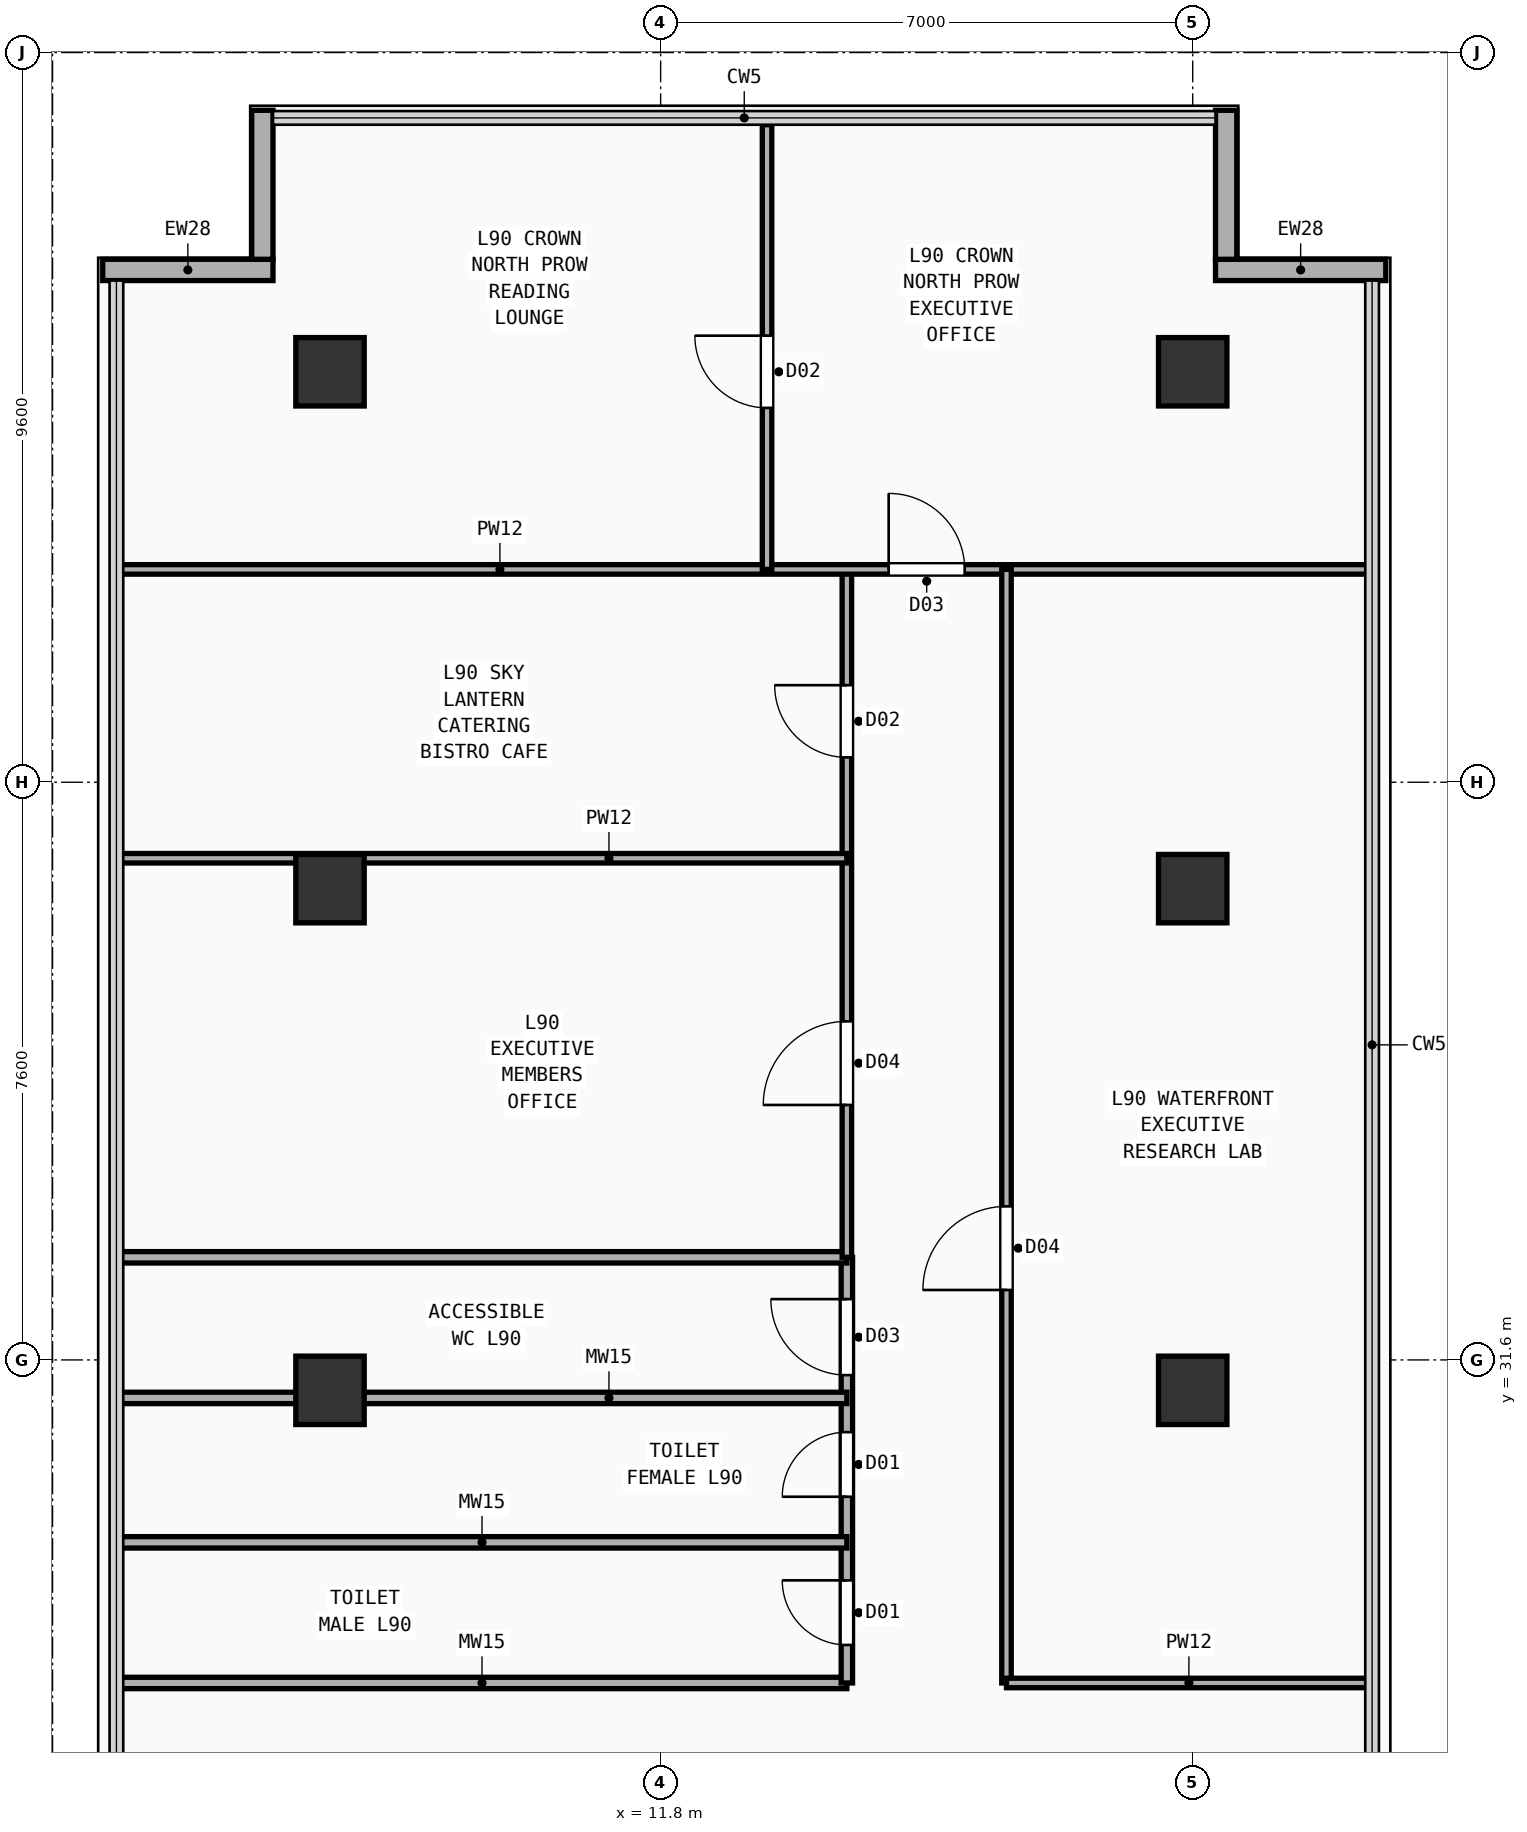
"""IFC4 building model, lengths in metres.
Left out: names, types, materials, properties, quantities, classifications, styles, units other than length and angle.
Written with IfcOpenShell. Run it as: python <this file> out.ifc"""

import sys

from ifc_helpers import new_model, si_unit, direction, frame, frame_2d, origin, origin_2d, place, context, subcontext, project, spatial, rectangle, extrude, element, fill, save


model = new_model("IFC4")
c1 = context("Model", 3, precision=1e-05, world=origin(), true_north=direction((0.0, 1.0)))
c2 = subcontext(c1, "Body", "Model", "MODEL_VIEW")
j1 = project(units=[si_unit("LENGTHUNIT", "METRE"), si_unit("PLANEANGLEUNIT", "RADIAN")], contexts=[c1])
p1 = place(None, origin())
s1 = spatial("IfcSite", under=j1, at=p1, CompositionType="ELEMENT")
p2 = place(p1, origin())
s2 = spatial("IfcBuilding", under=s1, at=p2, CompositionType="ELEMENT")
p3 = place(p2, frame((0.0, 0.0, 352.0)))
s3 = spatial("IfcBuildingStorey", under=s2, at=p3, CompositionType="ELEMENT", Elevation=352.0)
for number, where, z_axis, x_axis in (
    (1, (7.45, 31.2, 0.0), (0.0, 0.0, 1.0), (1.0, 0.0, 0.0)),
    (2, (7.45, 37.8, 0.0), (0.0, 0.0, 1.0), (1.0, 0.0, 0.0)),
    (3, (7.45, 44.6, 0.0), (0.0, 0.0, 1.0), (1.0, 0.0, 0.0)),
    (4, (18.8, 31.2, 0.0), (0.0, 0.0, 1.0), (1.0, 0.0, 0.0)),
    (5, (18.8, 37.8, 0.0), (0.0, 0.0, 1.0), (1.0, 0.0, 0.0)),
    (6, (18.8, 44.6, 0.0), (0.0, 0.0, 1.0), (1.0, 0.0, 0.0)),
):
    element("IfcColumn", number, at=place(p3, frame(where, z_axis=z_axis, x_axis=x_axis)), inside=s3, PredefinedType="COLUMN", context=c2, shape_type="SweptSolid", body=[
        extrude(rectangle(XDim=0.9, YDim=0.9, at=origin_2d()), origin(), (0.0, 0.0, 1.0), 3.82),
    ])
p4 = place(p3, frame((19.1, 45.94, 0.0), z_axis=(0.0, 0.0, 1.0), x_axis=(1.0, 0.0, 0.0)))
e7 = element("IfcWall", 7, at=p4, inside=s3, PredefinedType="SOLIDWALL", context=c2, shape_type="SweptSolid", body=[
    extrude(rectangle(XDim=2.24, YDim=0.28, at=frame_2d((1.12, 0.0))), origin(), (0.0, 0.0, 1.0), 3.82),
])
p5 = place(p3, frame((19.24, 46.08, 0.0), z_axis=(0.0, 0.0, 1.0), x_axis=(0.0, 1.0, 0.0)))
e8 = element("IfcWall", 8, at=p5, inside=s3, PredefinedType="SOLIDWALL", context=c2, shape_type="SweptSolid", body=[
    extrude(rectangle(XDim=1.96, YDim=0.28, at=frame_2d((0.98, 0.0))), origin(), (0.0, 0.0, 1.0), 3.82),
])
p6 = place(p3, frame((4.46, 45.94, 0.0), z_axis=(0.0, 0.0, 1.0), x_axis=(1.0, 0.0, 0.0)))
e9 = element("IfcWall", 9, at=p6, inside=s3, PredefinedType="SOLIDWALL", context=c2, shape_type="SweptSolid", body=[
    extrude(rectangle(XDim=2.24, YDim=0.28, at=frame_2d((1.12, 0.0))), origin(), (0.0, 0.0, 1.0), 3.82),
])
p7 = place(p3, frame((6.56, 46.08, 0.0), z_axis=(0.0, 0.0, 1.0), x_axis=(0.0, 1.0, 0.0)))
e10 = element("IfcWall", 10, at=p7, inside=s3, PredefinedType="SOLIDWALL", context=c2, shape_type="SweptSolid", body=[
    extrude(rectangle(XDim=1.96, YDim=0.28, at=frame_2d((0.98, 0.0))), origin(), (0.0, 0.0, 1.0), 3.82),
])
p8 = place(p3, frame((4.65, 27.35, 0.0), z_axis=(0.0, 0.0, 1.0), x_axis=(1.0, 0.0, 0.0)))
e11 = element("IfcWall", 11, at=p8, inside=s3, PredefinedType="PLUMBINGWALL", context=c2, shape_type="SweptSolid", body=[
    extrude(rectangle(XDim=9.6, YDim=0.15, at=frame_2d((4.8, 0.0))), origin(), (0.0, 0.0, 1.0), 3.82),
])
p9 = place(p3, frame((14.25, 27.35, 0.0), z_axis=(0.0, 0.0, 1.0), x_axis=(0.0, 1.0, 0.0)))
e12 = element("IfcWall", 12, at=p9, inside=s3, PredefinedType="PLUMBINGWALL", context=c2, shape_type="SweptSolid", body=[
    extrude(rectangle(XDim=5.6, YDim=0.15, at=frame_2d((2.8, 0.0))), origin(), (0.0, 0.0, 1.0), 3.82),
])
p10 = place(p9, frame((0.5, 0.0, 0.0)))
e13 = element("IfcOpeningElement", 13, at=p10, cuts=e12, PredefinedType="OPENING", context=c2, shape_type="SweptSolid", body=[
    extrude(rectangle(XDim=0.85, YDim=2.15, at=frame_2d((0.425, 1.075))), frame((0.0, 0.085, 0.0), z_axis=(0.0, -1.0, 0.0), x_axis=(1.0, 0.0, 0.0)), (0.0, 0.0, 1.0), 0.17),
])
p11 = place(p9, frame((2.45, 0.0, 0.0)))
e14 = element("IfcOpeningElement", 14, at=p11, cuts=e12, PredefinedType="OPENING", context=c2, shape_type="SweptSolid", body=[
    extrude(rectangle(XDim=0.85, YDim=2.15, at=frame_2d((0.425, 1.075))), frame((0.0, 0.085, 0.0), z_axis=(0.0, -1.0, 0.0), x_axis=(1.0, 0.0, 0.0)), (0.0, 0.0, 1.0), 0.17),
])
p12 = place(p9, frame((4.05, 0.0, 0.0)))
e15 = element("IfcOpeningElement", 15, at=p12, cuts=e12, PredefinedType="OPENING", context=c2, shape_type="SweptSolid", body=[
    extrude(rectangle(XDim=1.0, YDim=2.2, at=frame_2d((0.5, 1.1))), frame((0.0, 0.085, 0.0), z_axis=(0.0, -1.0, 0.0), x_axis=(1.0, 0.0, 0.0)), (0.0, 0.0, 1.0), 0.17),
])
p13 = place(p3, frame((4.65, 29.2, 0.0), z_axis=(0.0, 0.0, 1.0), x_axis=(1.0, 0.0, 0.0)))
e16 = element("IfcWall", 16, at=p13, inside=s3, PredefinedType="PLUMBINGWALL", context=c2, shape_type="SweptSolid", body=[
    extrude(rectangle(XDim=9.6, YDim=0.15, at=frame_2d((4.8, 0.0))), origin(), (0.0, 0.0, 1.0), 3.52),
])
p14 = place(p3, frame((4.65, 31.1, 0.0), z_axis=(0.0, 0.0, 1.0), x_axis=(1.0, 0.0, 0.0)))
e17 = element("IfcWall", 17, at=p14, inside=s3, PredefinedType="PLUMBINGWALL", context=c2, shape_type="SweptSolid", body=[
    extrude(rectangle(XDim=9.6, YDim=0.15, at=frame_2d((4.8, 0.0))), origin(), (0.0, 0.0, 1.0), 3.22),
])
p15 = place(p3, frame((4.65, 32.95, 0.0), z_axis=(0.0, 0.0, 1.0), x_axis=(1.0, 0.0, 0.0)))
e18 = element("IfcWall", 18, at=p15, inside=s3, PredefinedType="PLUMBINGWALL", context=c2, shape_type="SweptSolid", body=[
    extrude(rectangle(XDim=9.6, YDim=0.15, at=frame_2d((4.8, 0.0))), origin(), (0.0, 0.0, 1.0), 3.82),
])
p16 = place(p3, frame((14.25, 32.95, 0.0), z_axis=(0.0, 0.0, 1.0), x_axis=(0.0, 1.0, 0.0)))
e19 = element("IfcWall", 19, at=p16, inside=s3, PredefinedType="PARTITIONING", context=c2, shape_type="SweptSolid", body=[
    extrude(rectangle(XDim=9.05, YDim=0.125, at=frame_2d((4.525, 0.0))), origin(), (0.0, 0.0, 1.0), 3.82),
])
p17 = place(p16, frame((2.004, 0.0, 0.0)))
e20 = element("IfcOpeningElement", 20, at=p17, cuts=e19, PredefinedType="OPENING", context=c2, shape_type="SweptSolid", body=[
    extrude(rectangle(XDim=1.1, YDim=2.2, at=frame_2d((0.55, 1.1))), frame((0.0, 0.073, 0.0), z_axis=(0.0, -1.0, 0.0), x_axis=(1.0, 0.0, 0.0)), (0.0, 0.0, 1.0), 0.145),
])
p18 = place(p16, frame((6.577, 0.0, 0.0)))
e21 = element("IfcOpeningElement", 21, at=p18, cuts=e19, PredefinedType="OPENING", context=c2, shape_type="SweptSolid", body=[
    extrude(rectangle(XDim=0.95, YDim=2.15, at=frame_2d((0.475, 1.075))), frame((0.0, 0.073, 0.0), z_axis=(0.0, -1.0, 0.0), x_axis=(1.0, 0.0, 0.0)), (0.0, 0.0, 1.0), 0.145),
])
p19 = place(p3, frame((4.65, 38.2, 0.0), z_axis=(0.0, 0.0, 1.0), x_axis=(1.0, 0.0, 0.0)))
e22 = element("IfcWall", 22, at=p19, inside=s3, PredefinedType="PARTITIONING", context=c2, shape_type="SweptSolid", body=[
    extrude(rectangle(XDim=9.6, YDim=0.125, at=frame_2d((4.8, 0.0))), origin(), (0.0, 0.0, 1.0), 3.82),
])
p20 = place(p3, frame((4.65, 42.0, 0.0), z_axis=(0.0, 0.0, 1.0), x_axis=(1.0, 0.0, 0.0)))
e23 = element("IfcWall", 23, at=p20, inside=s3, PredefinedType="PARTITIONING", context=c2, shape_type="SweptSolid", body=[
    extrude(rectangle(XDim=16.5, YDim=0.125, at=frame_2d((8.25, 0.0))), origin(), (0.0, 0.0, 1.0), 3.82),
])
p21 = place(p20, frame((10.15, 0.0, 0.0)))
e24 = element("IfcOpeningElement", 24, at=p21, cuts=e23, PredefinedType="OPENING", context=c2, shape_type="SweptSolid", body=[
    extrude(rectangle(XDim=1.0, YDim=2.2, at=frame_2d((0.5, 1.1))), frame((0.0, 0.073, 0.0), z_axis=(0.0, -1.0, 0.0), x_axis=(1.0, 0.0, 0.0)), (0.0, 0.0, 1.0), 0.145),
])
p22 = place(p3, frame((13.2, 42.0, 0.0), z_axis=(0.0, 0.0, 1.0), x_axis=(0.0, 1.0, 0.0)))
e25 = element("IfcWall", 25, at=p22, inside=s3, PredefinedType="PARTITIONING", context=c2, shape_type="SweptSolid", body=[
    extrude(rectangle(XDim=5.85, YDim=0.125, at=frame_2d((2.925, 0.0))), origin(), (0.0, 0.0, 1.0), 3.82),
])
p23 = place(p22, frame((2.125, 0.0, 0.0)))
e26 = element("IfcOpeningElement", 26, at=p23, cuts=e25, PredefinedType="OPENING", context=c2, shape_type="SweptSolid", body=[
    extrude(rectangle(XDim=0.95, YDim=2.15, at=frame_2d((0.475, 1.075))), frame((0.0, 0.073, 0.0), z_axis=(0.0, -1.0, 0.0), x_axis=(1.0, 0.0, 0.0)), (0.0, 0.0, 1.0), 0.145),
])
p24 = place(p3, frame((16.35, 27.35, 0.0), z_axis=(0.0, 0.0, 1.0), x_axis=(0.0, 1.0, 0.0)))
e27 = element("IfcWall", 27, at=p24, inside=s3, PredefinedType="PARTITIONING", context=c2, shape_type="SweptSolid", body=[
    extrude(rectangle(XDim=14.65, YDim=0.125, at=frame_2d((7.325, 0.0))), origin(), (0.0, 0.0, 1.0), 3.82),
])
p25 = place(p24, frame((5.17, 0.0, 0.0)))
e28 = element("IfcOpeningElement", 28, at=p25, cuts=e27, PredefinedType="OPENING", context=c2, shape_type="SweptSolid", body=[
    extrude(rectangle(XDim=1.1, YDim=2.2, at=frame_2d((0.55, 1.1))), frame((0.0, 0.073, 0.0), z_axis=(0.0, -1.0, 0.0), x_axis=(1.0, 0.0, 0.0)), (0.0, 0.0, 1.0), 0.145),
])
p26 = place(p3, frame((16.35, 27.35, 0.0), z_axis=(0.0, 0.0, 1.0), x_axis=(1.0, 0.0, 0.0)))
e29 = element("IfcWall", 29, at=p26, inside=s3, PredefinedType="PARTITIONING", context=c2, shape_type="SweptSolid", body=[
    extrude(rectangle(XDim=4.8, YDim=0.125, at=frame_2d((2.4, 0.0))), origin(), (0.0, 0.0, 1.0), 3.82),
])
p27 = place(p10, origin())
e30 = element("IfcDoor", 30, at=p27, inside=s3, OperationType="SINGLE_SWING_RIGHT", PredefinedType="DOOR", context=c2, shape_type="SweptSolid", body=[
    extrude(rectangle(XDim=0.85, YDim=2.15, at=frame_2d((0.425, 1.075))), frame((0.0, 0.025, 0.0), z_axis=(0.0, -1.0, 0.0), x_axis=(1.0, 0.0, 0.0)), (0.0, 0.0, 1.0), 0.05),
])
fill(e13, e30)
p28 = place(p11, origin())
e31 = element("IfcDoor", 31, at=p28, inside=s3, OperationType="SINGLE_SWING_LEFT", PredefinedType="DOOR", context=c2, shape_type="SweptSolid", body=[
    extrude(rectangle(XDim=0.85, YDim=2.15, at=frame_2d((0.425, 1.075))), frame((0.0, 0.025, 0.0), z_axis=(0.0, -1.0, 0.0), x_axis=(1.0, 0.0, 0.0)), (0.0, 0.0, 1.0), 0.05),
])
fill(e14, e31)
p29 = place(p12, origin())
e32 = element("IfcDoor", 32, at=p29, inside=s3, OperationType="SINGLE_SWING_RIGHT", PredefinedType="DOOR", context=c2, shape_type="SweptSolid", body=[
    extrude(rectangle(XDim=1.0, YDim=2.2, at=frame_2d((0.5, 1.1))), frame((0.0, 0.025, 0.0), z_axis=(0.0, -1.0, 0.0), x_axis=(1.0, 0.0, 0.0)), (0.0, 0.0, 1.0), 0.05),
])
fill(e15, e32)
p30 = place(p17, origin())
e33 = element("IfcDoor", 33, at=p30, inside=s3, OperationType="SINGLE_SWING_LEFT", PredefinedType="DOOR", context=c2, shape_type="SweptSolid", body=[
    extrude(rectangle(XDim=1.1, YDim=2.2, at=frame_2d((0.55, 1.1))), frame((0.0, 0.025, 0.0), z_axis=(0.0, -1.0, 0.0), x_axis=(1.0, 0.0, 0.0)), (0.0, 0.0, 1.0), 0.05),
])
fill(e20, e33)
p31 = place(p18, origin())
e34 = element("IfcDoor", 34, at=p31, inside=s3, OperationType="SINGLE_SWING_RIGHT", PredefinedType="DOOR", context=c2, shape_type="SweptSolid", body=[
    extrude(rectangle(XDim=0.95, YDim=2.15, at=frame_2d((0.475, 1.075))), frame((0.0, 0.025, 0.0), z_axis=(0.0, -1.0, 0.0), x_axis=(1.0, 0.0, 0.0)), (0.0, 0.0, 1.0), 0.05),
])
fill(e21, e34)
p32 = place(p21, origin())
e35 = element("IfcDoor", 35, at=p32, inside=s3, OperationType="SINGLE_SWING_LEFT", PredefinedType="DOOR", context=c2, shape_type="SweptSolid", body=[
    extrude(rectangle(XDim=1.0, YDim=2.2, at=frame_2d((0.5, 1.1))), frame((0.0, 0.025, 0.0), z_axis=(0.0, -1.0, 0.0), x_axis=(1.0, 0.0, 0.0)), (0.0, 0.0, 1.0), 0.05),
])
fill(e24, e35)
p33 = place(p23, origin())
e36 = element("IfcDoor", 36, at=p33, inside=s3, OperationType="SINGLE_SWING_RIGHT", PredefinedType="DOOR", context=c2, shape_type="SweptSolid", body=[
    extrude(rectangle(XDim=0.95, YDim=2.15, at=frame_2d((0.475, 1.075))), frame((0.0, 0.025, 0.0), z_axis=(0.0, -1.0, 0.0), x_axis=(1.0, 0.0, 0.0)), (0.0, 0.0, 1.0), 0.05),
])
fill(e26, e36)
p34 = place(p25, origin())
e37 = element("IfcDoor", 37, at=p34, inside=s3, OperationType="SINGLE_SWING_LEFT", PredefinedType="DOOR", context=c2, shape_type="SweptSolid", body=[
    extrude(rectangle(XDim=1.1, YDim=2.2, at=frame_2d((0.55, 1.1))), frame((0.0, 0.025, 0.0), z_axis=(0.0, -1.0, 0.0), x_axis=(1.0, 0.0, 0.0)), (0.0, 0.0, 1.0), 0.05),
])
fill(e28, e37)
save(model, sys.argv[1])
